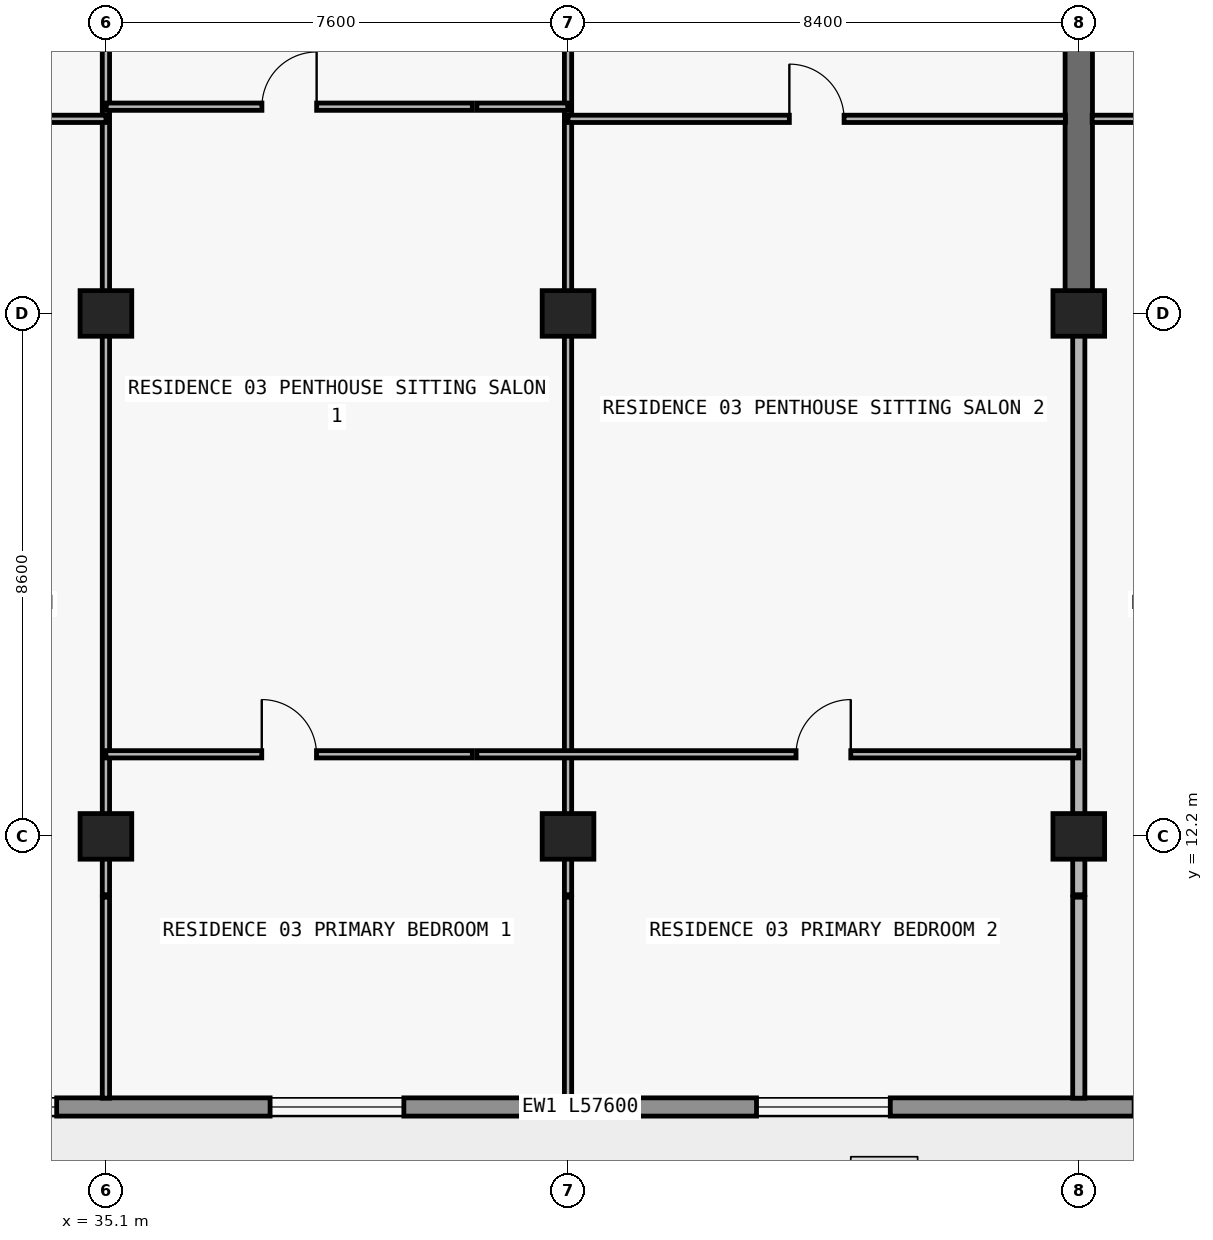
"""IFC4 building model, lengths in metres.
Left out: names, types, materials, properties, quantities, classifications, styles, units other than length and angle.
Written with IfcOpenShell. Run it as: python <this file> out.ifc"""

import sys

from ifc_helpers import new_model, si_unit, direction, frame, frame_2d, origin, origin_2d, place, context, subcontext, project, spatial, rectangle, extrude, element, fill, save


model = new_model("IFC4")
c1 = context("Model", 3, precision=1e-05, world=origin(), true_north=direction((0.0, 1.0)))
c2 = subcontext(c1, "Body", "Model", "MODEL_VIEW")
j1 = project(units=[si_unit("LENGTHUNIT", "METRE"), si_unit("PLANEANGLEUNIT", "RADIAN")], contexts=[c1])
p1 = place(None, origin())
s1 = spatial("IfcSite", under=j1, at=p1, CompositionType="ELEMENT")
p2 = place(p1, origin())
s2 = spatial("IfcBuilding", under=s1, at=p2, CompositionType="ELEMENT")
p3 = place(p2, frame((0.0, 0.0, 201.6)))
s3 = spatial("IfcBuildingStorey", under=s2, at=p3, CompositionType="ELEMENT", Elevation=201.6)
for number, where, z_axis, x_axis in (
    (1, (35.1, 12.2, 0.0), (0.0, 0.0, 1.0), (1.0, 0.0, 0.0)),
    (2, (42.7, 12.2, 0.0), (0.0, 0.0, 1.0), (1.0, 0.0, 0.0)),
    (3, (51.1, 12.2, 0.0), (0.0, 0.0, 1.0), (1.0, 0.0, 0.0)),
    (4, (35.1, 20.8, 0.0), (0.0, 0.0, 1.0), (1.0, 0.0, 0.0)),
    (5, (42.7, 20.8, 0.0), (0.0, 0.0, 1.0), (1.0, 0.0, 0.0)),
    (6, (51.1, 20.8, 0.0), (0.0, 0.0, 1.0), (1.0, 0.0, 0.0)),
):
    element("IfcColumn", number, at=place(p3, frame(where, z_axis=z_axis, x_axis=x_axis)), inside=s3, PredefinedType="COLUMN", context=c2, shape_type="SweptSolid", body=[
        extrude(rectangle(XDim=0.85, YDim=0.75, at=origin_2d()), origin(), (0.0, 0.0, 1.0), 3.05),
    ])
p4 = place(p3, frame((51.1, 20.8, 0.0), z_axis=(0.0, 0.0, 1.0), x_axis=(0.0, 1.0, 0.0)))
e7 = element("IfcWall", 7, at=p4, inside=s3, PredefinedType="SHEAR", context=c2, shape_type="SweptSolid", body=[
    extrude(rectangle(XDim=8.6, YDim=0.45, at=frame_2d((4.3, 0.0))), origin(), (0.0, 0.0, 1.0), 3.05),
])
p5 = place(p3, frame((67.7, 7.75, 0.0), z_axis=(0.0, 0.0, 1.0), x_axis=(-1.0, 0.0, 0.0)))
e8 = element("IfcWall", 8, at=p5, inside=s3, PredefinedType="STANDARD", context=c2, shape_type="SweptSolid", body=[
    extrude(rectangle(XDim=57.6, YDim=0.3, at=frame_2d((28.8, 0.0))), origin(), (0.0, 0.0, 1.0), 3.05),
])
p6 = place(p5, frame((54.673, 0.0, 0.0)))
e9 = element("IfcOpeningElement", 9, at=p6, cuts=e8, PredefinedType="OPENING", context=c2, shape_type="SweptSolid", body=[
    extrude(rectangle(XDim=2.0, YDim=2.3, at=frame_2d((1.0, 1.15))), frame((0.0, 0.16, 0.0), z_axis=(0.0, -1.0, 0.0), x_axis=(1.0, 0.0, 0.0)), (0.0, 0.0, 1.0), 0.32),
])
p7 = place(p5, frame((50.473, 0.0, 0.85)))
e10 = element("IfcOpeningElement", 10, at=p7, cuts=e8, PredefinedType="OPENING", context=c2, shape_type="SweptSolid", body=[
    extrude(rectangle(XDim=2.2, YDim=1.55, at=frame_2d((1.1, 0.775))), frame((0.0, 0.16, 0.0), z_axis=(0.0, -1.0, 0.0), x_axis=(1.0, 0.0, 0.0)), (0.0, 0.0, 1.0), 0.32),
])
p8 = place(p5, frame((46.09, 0.0, 0.0)))
e11 = element("IfcOpeningElement", 11, at=p8, cuts=e8, PredefinedType="OPENING", context=c2, shape_type="SweptSolid", body=[
    extrude(rectangle(XDim=2.0, YDim=2.3, at=frame_2d((1.0, 1.15))), frame((0.0, 0.16, 0.0), z_axis=(0.0, -1.0, 0.0), x_axis=(1.0, 0.0, 0.0)), (0.0, 0.0, 1.0), 0.32),
])
p9 = place(p5, frame((41.99, 0.0, 0.85)))
e12 = element("IfcOpeningElement", 12, at=p9, cuts=e8, PredefinedType="OPENING", context=c2, shape_type="SweptSolid", body=[
    extrude(rectangle(XDim=1.8, YDim=1.55, at=frame_2d((0.9, 0.775))), frame((0.0, 0.16, 0.0), z_axis=(0.0, -1.0, 0.0), x_axis=(1.0, 0.0, 0.0)), (0.0, 0.0, 1.0), 0.32),
])
p10 = place(p5, frame((38.09, 0.0, 0.0)))
e13 = element("IfcOpeningElement", 13, at=p10, cuts=e8, PredefinedType="OPENING", context=c2, shape_type="SweptSolid", body=[
    extrude(rectangle(XDim=2.0, YDim=2.3, at=frame_2d((1.0, 1.15))), frame((0.0, 0.16, 0.0), z_axis=(0.0, -1.0, 0.0), x_axis=(1.0, 0.0, 0.0)), (0.0, 0.0, 1.0), 0.32),
])
p11 = place(p5, frame((33.41, 0.0, 0.65)))
e14 = element("IfcOpeningElement", 14, at=p11, cuts=e8, PredefinedType="OPENING", context=c2, shape_type="SweptSolid", body=[
    extrude(rectangle(XDim=2.6, YDim=1.85, at=frame_2d((1.3, 0.925))), frame((0.0, 0.16, 0.0), z_axis=(0.0, -1.0, 0.0), x_axis=(1.0, 0.0, 0.0)), (0.0, 0.0, 1.0), 0.32),
])
p12 = place(p5, frame((27.7, 0.0, 0.85)))
e15 = element("IfcOpeningElement", 15, at=p12, cuts=e8, PredefinedType="OPENING", context=c2, shape_type="SweptSolid", body=[
    extrude(rectangle(XDim=2.2, YDim=1.55, at=frame_2d((1.1, 0.775))), frame((0.0, 0.16, 0.0), z_axis=(0.0, -1.0, 0.0), x_axis=(1.0, 0.0, 0.0)), (0.0, 0.0, 1.0), 0.32),
])
p13 = place(p5, frame((19.7, 0.0, 0.85)))
e16 = element("IfcOpeningElement", 16, at=p13, cuts=e8, PredefinedType="OPENING", context=c2, shape_type="SweptSolid", body=[
    extrude(rectangle(XDim=2.2, YDim=1.55, at=frame_2d((1.1, 0.775))), frame((0.0, 0.16, 0.0), z_axis=(0.0, -1.0, 0.0), x_axis=(1.0, 0.0, 0.0)), (0.0, 0.0, 1.0), 0.32),
])
p14 = place(p5, frame((13.69, 0.0, 0.0)))
e17 = element("IfcOpeningElement", 17, at=p14, cuts=e8, PredefinedType="OPENING", context=c2, shape_type="SweptSolid", body=[
    extrude(rectangle(XDim=2.0, YDim=2.3, at=frame_2d((1.0, 1.15))), frame((0.0, 0.16, 0.0), z_axis=(0.0, -1.0, 0.0), x_axis=(1.0, 0.0, 0.0)), (0.0, 0.0, 1.0), 0.32),
])
p15 = place(p5, frame((9.01, 0.0, 0.65)))
e18 = element("IfcOpeningElement", 18, at=p15, cuts=e8, PredefinedType="OPENING", context=c2, shape_type="SweptSolid", body=[
    extrude(rectangle(XDim=2.6, YDim=1.85, at=frame_2d((1.3, 0.925))), frame((0.0, 0.16, 0.0), z_axis=(0.0, -1.0, 0.0), x_axis=(1.0, 0.0, 0.0)), (0.0, 0.0, 1.0), 0.32),
])
p16 = place(p5, frame((3.0, 0.0, 0.85)))
e19 = element("IfcOpeningElement", 19, at=p16, cuts=e8, PredefinedType="OPENING", context=c2, shape_type="SweptSolid", body=[
    extrude(rectangle(XDim=2.2, YDim=1.55, at=frame_2d((1.1, 0.775))), frame((0.0, 0.16, 0.0), z_axis=(0.0, -1.0, 0.0), x_axis=(1.0, 0.0, 0.0)), (0.0, 0.0, 1.0), 0.32),
])
p17 = place(p3, frame((35.1, 7.895, 0.0), z_axis=(0.0, 0.0, 1.0), x_axis=(0.0, 1.0, 0.0)))
e20 = element("IfcWall", 20, at=p17, inside=s3, PredefinedType="PARTITIONING", context=c2, shape_type="SweptSolid", body=[
    extrude(rectangle(XDim=3.305, YDim=0.12, at=frame_2d((1.652, 0.0))), origin(), (0.0, 0.0, 1.0), 3.05),
])
p18 = place(p3, frame((35.1, 11.24, 0.0), z_axis=(0.0, 0.0, 1.0), x_axis=(0.0, 1.0, 0.0)))
e21 = element("IfcWall", 21, at=p18, inside=s3, PredefinedType="PARTITIONING", context=c2, shape_type="SweptSolid", body=[
    extrude(rectangle(XDim=23.46, YDim=0.12, at=frame_2d((11.73, 0.0))), origin(), (0.0, 0.0, 1.0), 2.263),
])
p19 = place(p18, frame((14.71, 0.0, 0.0)))
e22 = element("IfcOpeningElement", 22, at=p19, cuts=e21, PredefinedType="OPENING", context=c2, shape_type="SweptSolid", body=[
    extrude(rectangle(XDim=0.9, YDim=2.15, at=frame_2d((0.45, 1.075))), frame((0.0, 0.07, 0.0), z_axis=(0.0, -1.0, 0.0), x_axis=(1.0, 0.0, 0.0)), (0.0, 0.0, 1.0), 0.14),
])
p20 = place(p3, frame((42.7, 7.895, 0.0), z_axis=(0.0, 0.0, 1.0), x_axis=(0.0, 1.0, 0.0)))
e23 = element("IfcWall", 23, at=p20, inside=s3, PredefinedType="PARTITIONING", context=c2, shape_type="SweptSolid", body=[
    extrude(rectangle(XDim=3.305, YDim=0.12, at=frame_2d((1.652, 0.0))), origin(), (0.0, 0.0, 1.0), 3.05),
])
p21 = place(p3, frame((42.7, 11.24, 0.0), z_axis=(0.0, 0.0, 1.0), x_axis=(0.0, 1.0, 0.0)))
e24 = element("IfcWall", 24, at=p21, inside=s3, PredefinedType="PARTITIONING", context=c2, shape_type="SweptSolid", body=[
    extrude(rectangle(XDim=23.46, YDim=0.12, at=frame_2d((11.73, 0.0))), origin(), (0.0, 0.0, 1.0), 2.263),
])
p22 = place(p21, frame((14.71, 0.0, 0.0)))
e25 = element("IfcOpeningElement", 25, at=p22, cuts=e24, PredefinedType="OPENING", context=c2, shape_type="SweptSolid", body=[
    extrude(rectangle(XDim=0.9, YDim=2.15, at=frame_2d((0.45, 1.075))), frame((0.0, 0.07, 0.0), z_axis=(0.0, -1.0, 0.0), x_axis=(1.0, 0.0, 0.0)), (0.0, 0.0, 1.0), 0.14),
])
p23 = place(p3, frame((51.1, 7.895, 0.0), z_axis=(0.0, 0.0, 1.0), x_axis=(0.0, 1.0, 0.0)))
e26 = element("IfcWall", 26, at=p23, inside=s3, PredefinedType="PARTITIONING", context=c2, shape_type="SweptSolid", body=[
    extrude(rectangle(XDim=3.305, YDim=0.2, at=frame_2d((1.652, 0.0))), origin(), (0.0, 0.0, 1.0), 3.05),
])
p24 = place(p3, frame((51.1, 11.24, 0.0), z_axis=(0.0, 0.0, 1.0), x_axis=(0.0, 1.0, 0.0)))
e27 = element("IfcWall", 27, at=p24, inside=s3, PredefinedType="PARTITIONING", context=c2, shape_type="SweptSolid", body=[
    extrude(rectangle(XDim=9.555, YDim=0.2, at=frame_2d((4.777, 0.0))), origin(), (0.0, 0.0, 1.0), 2.263),
])
p25 = place(p3, frame((35.1, 13.55, 0.0), z_axis=(0.0, 0.0, 1.0), x_axis=(1.0, 0.0, 0.0)))
e28 = element("IfcWall", 28, at=p25, inside=s3, PredefinedType="PARTITIONING", context=c2, shape_type="SweptSolid", body=[
    extrude(rectangle(XDim=6.026, YDim=0.12, at=frame_2d((3.013, 0.0))), origin(), (0.0, 0.0, 1.0), 3.05),
])
p26 = place(p25, frame((2.563, 0.0, 0.0)))
e29 = element("IfcOpeningElement", 29, at=p26, cuts=e28, PredefinedType="OPENING", context=c2, shape_type="SweptSolid", body=[
    extrude(rectangle(XDim=0.9, YDim=2.15, at=frame_2d((0.45, 1.075))), frame((0.0, 0.07, 0.0), z_axis=(0.0, -1.0, 0.0), x_axis=(1.0, 0.0, 0.0)), (0.0, 0.0, 1.0), 0.14),
])
p27 = place(p3, frame((41.2, 13.55, 0.0), z_axis=(0.0, 0.0, 1.0), x_axis=(1.0, 0.0, 0.0)))
e30 = element("IfcWall", 30, at=p27, inside=s3, PredefinedType="PARTITIONING", context=c2, shape_type="SweptSolid", body=[
    extrude(rectangle(XDim=9.9, YDim=0.12, at=frame_2d((4.95, 0.0))), origin(), (0.0, 0.0, 1.0), 3.05),
])
p28 = place(p27, frame((5.25, 0.0, 0.0)))
e31 = element("IfcOpeningElement", 31, at=p28, cuts=e30, PredefinedType="OPENING", context=c2, shape_type="SweptSolid", body=[
    extrude(rectangle(XDim=0.9, YDim=2.15, at=frame_2d((0.45, 1.075))), frame((0.0, 0.07, 0.0), z_axis=(0.0, -1.0, 0.0), x_axis=(1.0, 0.0, 0.0)), (0.0, 0.0, 1.0), 0.14),
])
p29 = place(p3, frame((26.92, 24.0, 0.0), z_axis=(0.0, 0.0, 1.0), x_axis=(1.0, 0.0, 0.0)))
e32 = element("IfcWall", 32, at=p29, inside=s3, PredefinedType="PARTITIONING", context=c2, shape_type="SweptSolid", body=[
    extrude(rectangle(XDim=8.18, YDim=0.12, at=frame_2d((4.09, 0.0))), origin(), (0.0, 0.0, 1.0), 3.05),
])
p30 = place(p29, frame((1.33, 0.0, 0.0)))
e33 = element("IfcOpeningElement", 33, at=p30, cuts=e32, PredefinedType="OPENING", context=c2, shape_type="SweptSolid", body=[
    extrude(rectangle(XDim=0.9, YDim=2.15, at=frame_2d((0.45, 1.075))), frame((0.0, 0.07, 0.0), z_axis=(0.0, -1.0, 0.0), x_axis=(1.0, 0.0, 0.0)), (0.0, 0.0, 1.0), 0.14),
])
p31 = place(p3, frame((42.7, 24.0, 0.0), z_axis=(0.0, 0.0, 1.0), x_axis=(1.0, 0.0, 0.0)))
e34 = element("IfcWall", 34, at=p31, inside=s3, PredefinedType="PARTITIONING", context=c2, shape_type="SweptSolid", body=[
    extrude(rectangle(XDim=8.18, YDim=0.12, at=frame_2d((4.09, 0.0))), origin(), (0.0, 0.0, 1.0), 3.05),
])
p32 = place(p31, frame((3.64, 0.0, 0.0)))
e35 = element("IfcOpeningElement", 35, at=p32, cuts=e34, PredefinedType="OPENING", context=c2, shape_type="SweptSolid", body=[
    extrude(rectangle(XDim=0.9, YDim=2.15, at=frame_2d((0.45, 1.075))), frame((0.0, 0.07, 0.0), z_axis=(0.0, -1.0, 0.0), x_axis=(1.0, 0.0, 0.0)), (0.0, 0.0, 1.0), 0.14),
])
p33 = place(p3, frame((51.32, 24.0, 0.0), z_axis=(0.0, 0.0, 1.0), x_axis=(1.0, 0.0, 0.0)))
e36 = element("IfcWall", 36, at=p33, inside=s3, PredefinedType="PARTITIONING", context=c2, shape_type="SweptSolid", body=[
    extrude(rectangle(XDim=8.18, YDim=0.12, at=frame_2d((4.09, 0.0))), origin(), (0.0, 0.0, 1.0), 3.05),
])
p34 = place(p33, frame((1.204, 0.0, 0.0)))
e37 = element("IfcOpeningElement", 37, at=p34, cuts=e36, PredefinedType="OPENING", context=c2, shape_type="SweptSolid", body=[
    extrude(rectangle(XDim=0.9, YDim=2.15, at=frame_2d((0.45, 1.075))), frame((0.0, 0.07, 0.0), z_axis=(0.0, -1.0, 0.0), x_axis=(1.0, 0.0, 0.0)), (0.0, 0.0, 1.0), 0.14),
])
p35 = place(p3, frame((35.105, 24.2, 0.0), z_axis=(0.0, 0.0, 1.0), x_axis=(1.0, 0.0, 0.0)))
e38 = element("IfcWall", 38, at=p35, inside=s3, PredefinedType="PARTITIONING", context=c2, shape_type="SweptSolid", body=[
    extrude(rectangle(XDim=6.021, YDim=0.12, at=frame_2d((3.01, 0.0))), origin(), (0.0, 0.0, 1.0), 3.05),
])
p36 = place(p35, frame((2.561, 0.0, 0.0)))
e39 = element("IfcOpeningElement", 39, at=p36, cuts=e38, PredefinedType="OPENING", context=c2, shape_type="SweptSolid", body=[
    extrude(rectangle(XDim=0.9, YDim=2.15, at=frame_2d((0.45, 1.075))), frame((0.0, 0.07, 0.0), z_axis=(0.0, -1.0, 0.0), x_axis=(1.0, 0.0, 0.0)), (0.0, 0.0, 1.0), 0.14),
])
p37 = place(p3, frame((41.2, 24.2, 0.0), z_axis=(0.0, 0.0, 1.0), x_axis=(1.0, 0.0, 0.0)))
e40 = element("IfcWall", 40, at=p37, inside=s3, PredefinedType="PARTITIONING", context=c2, shape_type="SweptSolid", body=[
    extrude(rectangle(XDim=1.495, YDim=0.12, at=frame_2d((0.748, 0.0))), origin(), (0.0, 0.0, 1.0), 3.05),
])
p38 = place(p11, origin())
e41 = element("IfcWindow", 41, at=p38, inside=s3, PartitioningType="SINGLE_PANEL", PredefinedType="WINDOW", context=c2, shape_type="SweptSolid", body=[
    extrude(rectangle(XDim=2.6, YDim=1.85, at=frame_2d((1.3, 0.925))), frame((0.0, 0.03, 0.0), z_axis=(0.0, -1.0, 0.0), x_axis=(1.0, 0.0, 0.0)), (0.0, 0.0, 1.0), 0.06),
])
fill(e14, e41)
p39 = place(p12, origin())
e42 = element("IfcWindow", 42, at=p39, inside=s3, PartitioningType="SINGLE_PANEL", PredefinedType="WINDOW", context=c2, shape_type="SweptSolid", body=[
    extrude(rectangle(XDim=2.2, YDim=1.55, at=frame_2d((1.1, 0.775))), frame((0.0, 0.03, 0.0), z_axis=(0.0, -1.0, 0.0), x_axis=(1.0, 0.0, 0.0)), (0.0, 0.0, 1.0), 0.06),
])
fill(e15, e42)
p40 = place(p13, origin())
e43 = element("IfcWindow", 43, at=p40, inside=s3, PartitioningType="SINGLE_PANEL", PredefinedType="WINDOW", context=c2, shape_type="SweptSolid", body=[
    extrude(rectangle(XDim=2.2, YDim=1.55, at=frame_2d((1.1, 0.775))), frame((0.0, 0.03, 0.0), z_axis=(0.0, -1.0, 0.0), x_axis=(1.0, 0.0, 0.0)), (0.0, 0.0, 1.0), 0.06),
])
fill(e16, e43)
p41 = place(p36, origin())
e44 = element("IfcDoor", 44, at=p41, inside=s3, OperationType="SINGLE_SWING_RIGHT", PredefinedType="DOOR", context=c2, shape_type="SweptSolid", body=[
    extrude(rectangle(XDim=0.9, YDim=2.15, at=frame_2d((0.45, 1.075))), frame((0.0, 0.025, 0.0), z_axis=(0.0, -1.0, 0.0), x_axis=(1.0, 0.0, 0.0)), (0.0, 0.0, 1.0), 0.05),
])
fill(e39, e44)
p42 = place(p26, origin())
e45 = element("IfcDoor", 45, at=p42, inside=s3, OperationType="SINGLE_SWING_LEFT", PredefinedType="DOOR", context=c2, shape_type="SweptSolid", body=[
    extrude(rectangle(XDim=0.9, YDim=2.15, at=frame_2d((0.45, 1.075))), frame((0.0, 0.025, 0.0), z_axis=(0.0, -1.0, 0.0), x_axis=(1.0, 0.0, 0.0)), (0.0, 0.0, 1.0), 0.05),
])
fill(e29, e45)
p43 = place(p32, origin())
e46 = element("IfcDoor", 46, at=p43, inside=s3, OperationType="SINGLE_SWING_LEFT", PredefinedType="DOOR", context=c2, shape_type="SweptSolid", body=[
    extrude(rectangle(XDim=0.9, YDim=2.15, at=frame_2d((0.45, 1.075))), frame((0.0, 0.025, 0.0), z_axis=(0.0, -1.0, 0.0), x_axis=(1.0, 0.0, 0.0)), (0.0, 0.0, 1.0), 0.05),
])
fill(e35, e46)
p44 = place(p28, origin())
e47 = element("IfcDoor", 47, at=p44, inside=s3, OperationType="SINGLE_SWING_RIGHT", PredefinedType="DOOR", context=c2, shape_type="SweptSolid", body=[
    extrude(rectangle(XDim=0.9, YDim=2.15, at=frame_2d((0.45, 1.075))), frame((0.0, 0.025, 0.0), z_axis=(0.0, -1.0, 0.0), x_axis=(1.0, 0.0, 0.0)), (0.0, 0.0, 1.0), 0.05),
])
fill(e31, e47)
save(model, sys.argv[1])
